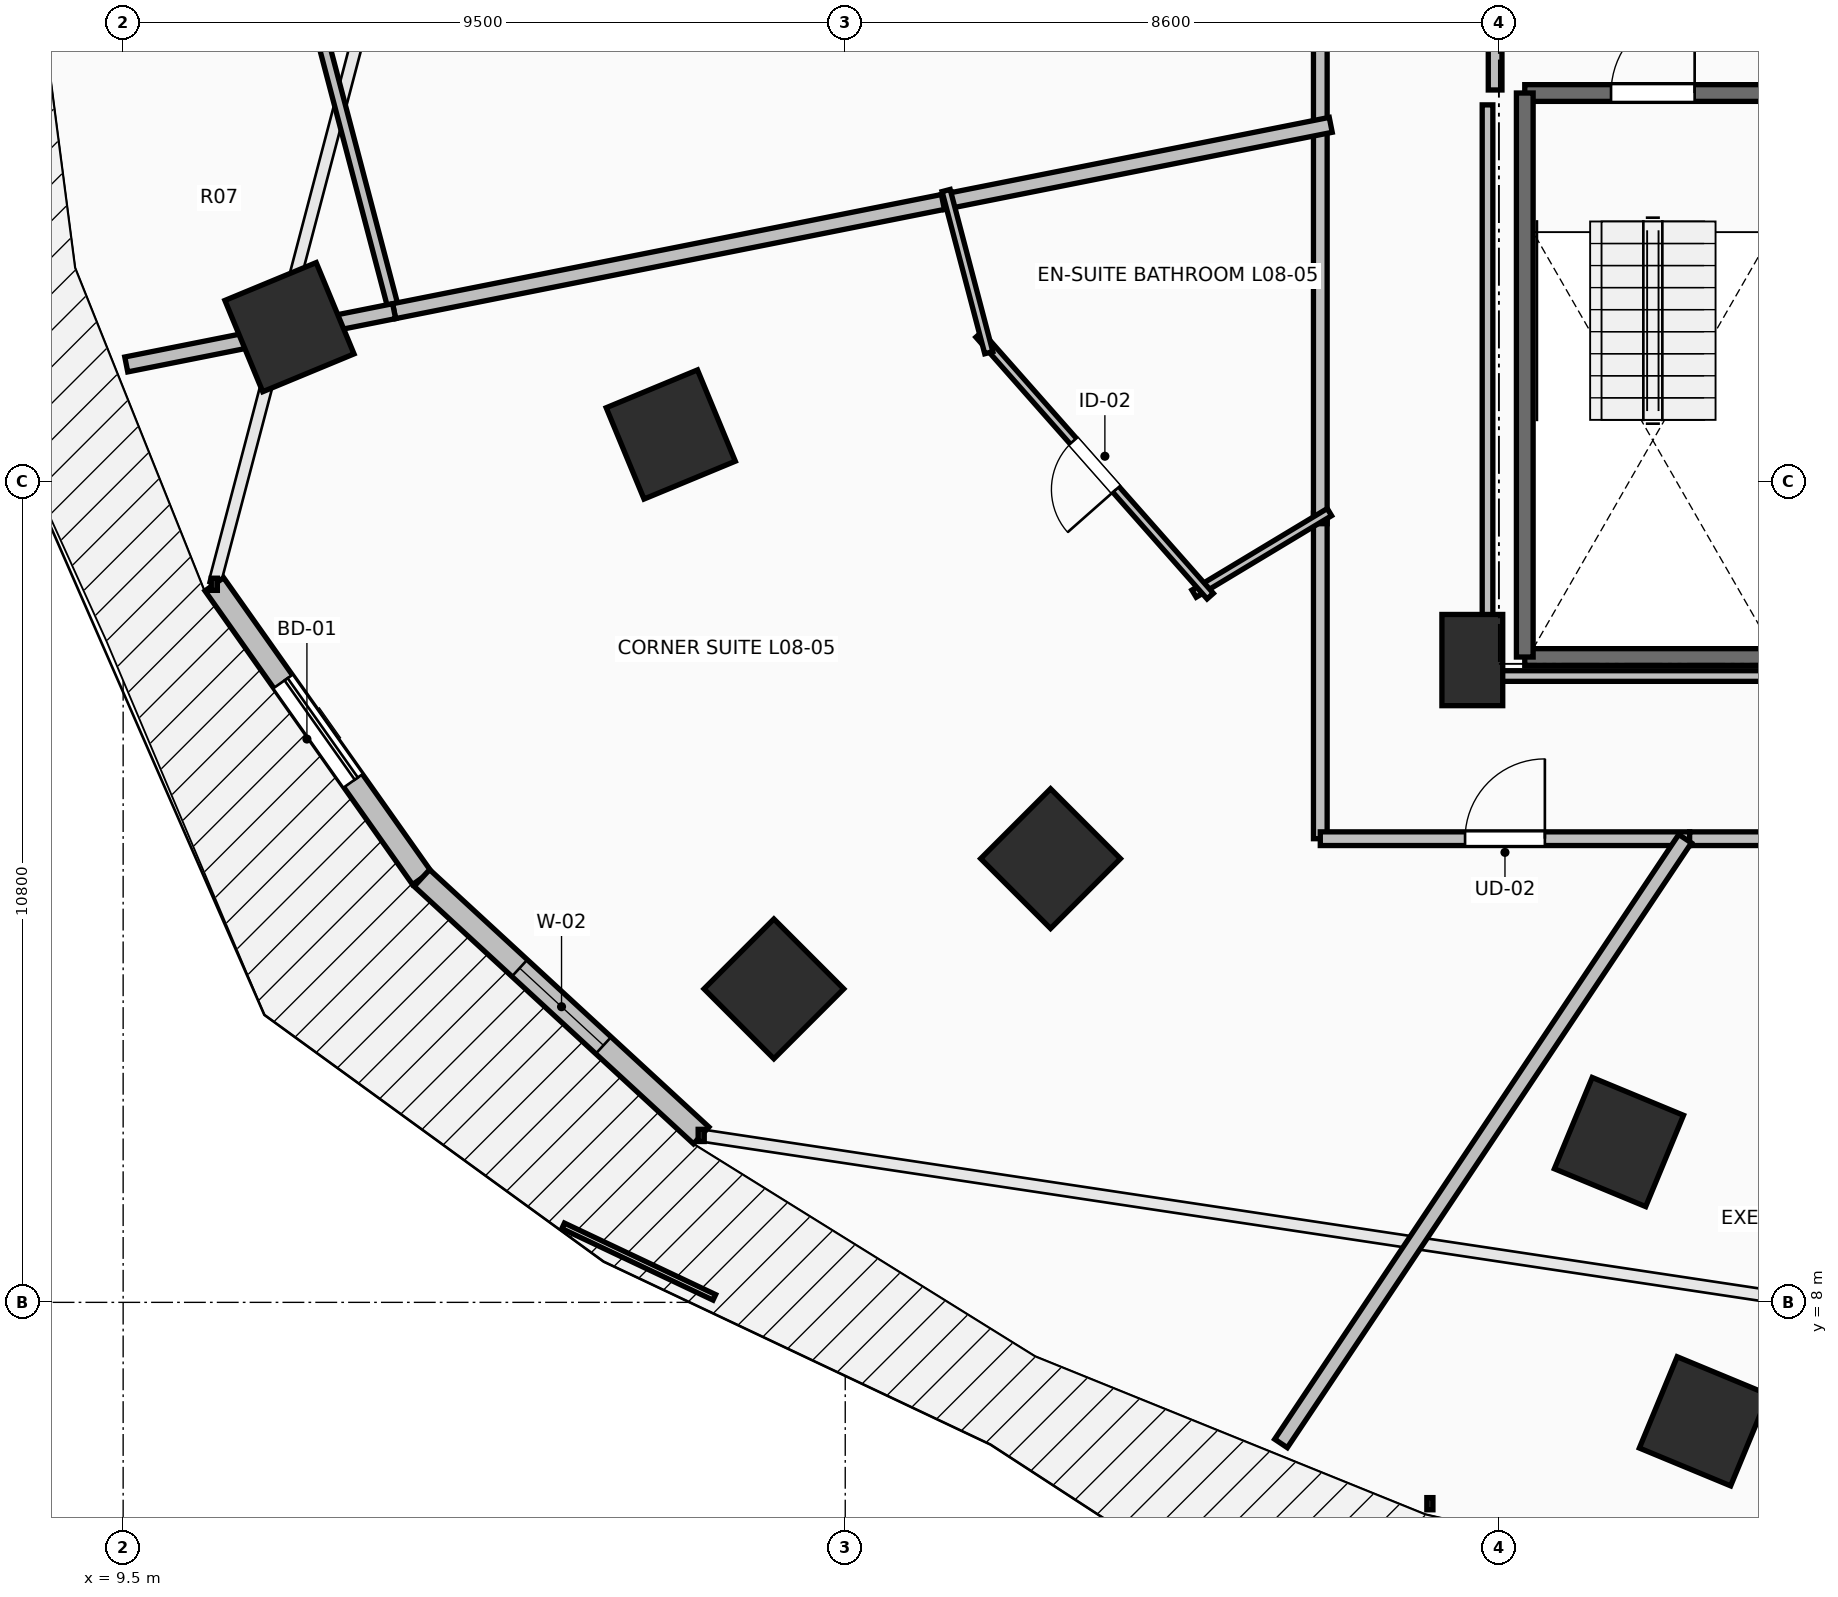
"""IFC4 building model, lengths in metres.
Left out: names, types, materials, properties, quantities, classifications, styles, units other than length and angle.
Written with IfcOpenShell. Run it as: python <this file> out.ifc"""

import sys

from ifc_helpers import new_model, si_unit, direction, frame, frame_2d, origin, origin_2d, place, context, subcontext, project, spatial, rectangle, extrude, element, fill, save


model = new_model("IFC4")
c1 = context("Model", 3, precision=1e-05, world=origin(), true_north=direction((0.0, 1.0)))
c2 = subcontext(c1, "Body", "Model", "MODEL_VIEW")
j1 = project(units=[si_unit("LENGTHUNIT", "METRE"), si_unit("PLANEANGLEUNIT", "RADIAN")], contexts=[c1])
p1 = place(None, origin())
s1 = spatial("IfcSite", under=j1, at=p1, CompositionType="ELEMENT")
p2 = place(p1, origin())
s2 = spatial("IfcBuilding", under=s1, at=p2, CompositionType="ELEMENT")
p3 = place(p2, frame((0.0, 0.0, 34.5)))
s3 = spatial("IfcBuildingStorey", under=s2, at=p3, CompositionType="ELEMENT", Elevation=34.5)
for number, where, z_axis, x_axis in (
    (1, (16.705, 19.418, 0.0), (0.0, 0.0, 1.0), (-0.924, -0.383, 0.0)),
    (2, (21.701, 13.838, 0.0), (0.0, 0.0, 1.0), (-0.707, -0.707, 0.0)),
    (3, (29.179, 10.109, 0.0), (0.0, 0.0, 1.0), (-0.383, -0.924, 0.0)),
    (4, (11.688, 20.83, 0.0), (0.0, 0.0, 1.0), (-0.924, -0.383, 0.0)),
    (5, (18.061, 12.124, 0.0), (0.0, 0.0, 1.0), (-0.707, -0.707, 0.0)),
    (6, (30.297, 6.435, 0.0), (0.0, 0.0, 1.0), (-0.383, -0.924, 0.0)),
):
    element("IfcColumn", number, at=place(p3, frame(where, z_axis=z_axis, x_axis=x_axis)), inside=s3, PredefinedType="COLUMN", context=c2, shape_type="SweptSolid", body=[
        extrude(rectangle(XDim=1.3, YDim=1.3, at=origin_2d()), origin(), (0.0, 0.0, 1.0), 3.5),
    ])
p4 = place(p3, frame((27.25, 16.45, 0.0), z_axis=(0.0, 0.0, 1.0), x_axis=(1.0, 0.0, 0.0)))
e7 = element("IfcColumn", 7, at=p4, inside=s3, PredefinedType="PILASTER", context=c2, shape_type="SweptSolid", body=[
    extrude(rectangle(XDim=0.8, YDim=1.2, at=origin_2d()), origin(), (0.0, 0.0, 1.0), 3.5),
])
p5 = place(p3, frame((10.699, 17.447, 0.0), z_axis=(0.0, 0.0, 1.0), x_axis=(0.577130815624, -0.816651713803, 0.0)))
e8 = element("IfcWall", 8, at=p5, inside=s3, PredefinedType="STANDARD", context=c2, shape_type="SweptSolid", body=[
    extrude(rectangle(XDim=4.731, YDim=0.3, at=frame_2d((2.366, 0.0))), origin(), (0.0, 0.0, 1.0), 3.24),
])
p6 = place(p5, frame((1.566, 0.0, 0.0)))
e9 = element("IfcOpeningElement", 9, at=p6, cuts=e8, PredefinedType="OPENING", context=c2, shape_type="SweptSolid", body=[
    extrude(rectangle(XDim=1.6, YDim=2.3, at=frame_2d((0.8, 1.15))), frame((0.0, 0.165, 0.0), z_axis=(0.0, -1.0, 0.0), x_axis=(1.0, 0.0, 0.0)), (0.0, 0.0, 1.0), 0.33),
])
p7 = place(p3, frame((13.43, 13.583, 0.0), z_axis=(0.0, 0.0, 1.0), x_axis=(0.735342629635, -0.677695519419, 0.0)))
e10 = element("IfcWall", 10, at=p7, inside=s3, PredefinedType="STANDARD", context=c2, shape_type="SweptSolid", body=[
    extrude(rectangle(XDim=4.997, YDim=0.3, at=frame_2d((2.499, 0.0))), origin(), (0.0, 0.0, 1.0), 3.24),
])
p8 = place(p7, frame((1.749, 0.0, 0.85)))
e11 = element("IfcOpeningElement", 11, at=p8, cuts=e10, PredefinedType="OPENING", context=c2, shape_type="SweptSolid", body=[
    extrude(rectangle(XDim=1.5, YDim=2.19, at=frame_2d((0.75, 1.095))), frame((0.0, 0.165, 0.0), z_axis=(0.0, -1.0, 0.0), x_axis=(1.0, 0.0, 0.0)), (0.0, 0.0, 1.0), 0.33),
])
p9 = place(p3, frame((27.94, 23.91, 0.0), z_axis=(0.0, 0.0, 1.0), x_axis=(1.0, 0.0, 0.0)))
e12 = element("IfcWall", 12, at=p9, inside=s3, PredefinedType="SOLIDWALL", context=c2, shape_type="SweptSolid", body=[
    extrude(rectangle(XDim=3.37, YDim=0.22, at=frame_2d((1.685, 0.0))), origin(), (0.0, 0.0, 1.0), 3.24),
])
p10 = place(p9, frame((1.135, 0.0, 0.0)))
e13 = element("IfcOpeningElement", 13, at=p10, cuts=e12, PredefinedType="OPENING", context=c2, shape_type="SweptSolid", body=[
    extrude(rectangle(XDim=1.1, YDim=2.15, at=frame_2d((0.55, 1.075))), frame((0.0, 0.125, 0.0), z_axis=(0.0, -1.0, 0.0), x_axis=(1.0, 0.0, 0.0)), (0.0, 0.0, 1.0), 0.25),
])
p11 = place(p3, frame((31.31, 16.49, 0.0), z_axis=(0.0, 0.0, 1.0), x_axis=(-1.0, 0.0, 0.0)))
e14 = element("IfcWall", 14, at=p11, inside=s3, PredefinedType="SOLIDWALL", context=c2, shape_type="SweptSolid", body=[
    extrude(rectangle(XDim=3.37, YDim=0.22, at=frame_2d((1.685, 0.0))), origin(), (0.0, 0.0, 1.0), 3.24),
])
p12 = place(p3, frame((27.94, 16.49, 0.0), z_axis=(0.0, 0.0, 1.0), x_axis=(0.0, 1.0, 0.0)))
e15 = element("IfcWall", 15, at=p12, inside=s3, PredefinedType="SOLIDWALL", context=c2, shape_type="SweptSolid", body=[
    extrude(rectangle(XDim=7.42, YDim=0.22, at=frame_2d((3.71, 0.0))), origin(), (0.0, 0.0, 1.0), 3.24),
])
p13 = place(p3, frame((27.55, 28.0, 0.0), z_axis=(0.0, 0.0, 1.0), x_axis=(0.0, -1.0, 0.0)))
e16 = element("IfcWall", 16, at=p13, inside=s3, PredefinedType="PARTITIONING", context=c2, shape_type="SweptSolid", body=[
    extrude(rectangle(XDim=4.05, YDim=0.18, at=frame_2d((2.025, 0.0))), origin(), (0.0, 0.0, 1.0), 3.24),
])
p14 = place(p13, frame((1.425, 0.0, 0.0)))
e17 = element("IfcOpeningElement", 17, at=p14, cuts=e16, PredefinedType="OPENING", context=c2, shape_type="SweptSolid", body=[
    extrude(rectangle(XDim=1.2, YDim=2.15, at=frame_2d((0.6, 1.075))), frame((0.0, 0.105, 0.0), z_axis=(0.0, -1.0, 0.0), x_axis=(1.0, 0.0, 0.0)), (0.0, 0.0, 1.0), 0.21),
])
p15 = place(p3, frame((25.25, 29.229, 0.0), z_axis=(0.0, 0.0, 1.0), x_axis=(0.0, -1.0, 0.0)))
e18 = element("IfcWall", 18, at=p15, inside=s3, PredefinedType="PARTITIONING", context=c2, shape_type="SweptSolid", body=[
    extrude(rectangle(XDim=5.826, YDim=0.18, at=frame_2d((2.913, 0.0))), origin(), (0.0, 0.0, 1.0), 2.432),
])
p16 = place(p15, frame((2.388, 0.0, 0.0)))
e19 = element("IfcOpeningElement", 19, at=p16, cuts=e18, PredefinedType="OPENING", context=c2, shape_type="SweptSolid", body=[
    extrude(rectangle(XDim=1.05, YDim=2.2, at=frame_2d((0.525, 1.1))), frame((0.0, 0.105, 0.0), z_axis=(0.0, -1.0, 0.0), x_axis=(1.0, 0.0, 0.0)), (0.0, 0.0, 1.0), 0.21),
])
p17 = place(p3, frame((25.25, 18.384, 0.0), z_axis=(0.0, 0.0, 1.0), x_axis=(0.0, -1.0, 0.0)))
e20 = element("IfcWall", 20, at=p17, inside=s3, PredefinedType="PARTITIONING", context=c2, shape_type="SweptSolid", body=[
    extrude(rectangle(XDim=4.284, YDim=0.18, at=frame_2d((2.142, 0.0))), origin(), (0.0, 0.0, 1.0), 2.432),
])
p18 = place(p3, frame((25.25, 14.1, 0.0), z_axis=(0.0, 0.0, 1.0), x_axis=(1.0, 0.0, 0.0)))
e21 = element("IfcWall", 21, at=p18, inside=s3, PredefinedType="PARTITIONING", context=c2, shape_type="SweptSolid", body=[
    extrude(rectangle(XDim=4.859, YDim=0.18, at=frame_2d((2.429, 0.0))), origin(), (0.0, 0.0, 1.0), 2.432),
])
p19 = place(p18, frame((1.905, 0.0, 0.0)))
e22 = element("IfcOpeningElement", 22, at=p19, cuts=e21, PredefinedType="OPENING", context=c2, shape_type="SweptSolid", body=[
    extrude(rectangle(XDim=1.05, YDim=2.2, at=frame_2d((0.525, 1.1))), frame((0.0, 0.105, 0.0), z_axis=(0.0, -1.0, 0.0), x_axis=(1.0, 0.0, 0.0)), (0.0, 0.0, 1.0), 0.21),
])
p20 = place(p3, frame((25.25, 23.543, 0.0), z_axis=(0.0, 0.0, 1.0), x_axis=(0.0, -1.0, 0.0)))
e23 = element("IfcWall", 23, at=p20, inside=s3, PredefinedType="PARTITIONING", context=c2, shape_type="SweptSolid", body=[
    extrude(rectangle(XDim=5.299, YDim=0.18, at=frame_2d((2.649, 0.0))), origin(), (0.0, 0.0, 1.0), 3.24),
])
p21 = place(p3, frame((30.109, 14.1, 0.0), z_axis=(0.0, 0.0, 1.0), x_axis=(1.0, 0.0, 0.0)))
e24 = element("IfcWall", 24, at=p21, inside=s3, PredefinedType="PARTITIONING", context=c2, shape_type="SweptSolid", body=[
    extrude(rectangle(XDim=10.319, YDim=0.18, at=frame_2d((5.16, 0.0))), origin(), (0.0, 0.0, 1.0), 3.24),
])
p22 = place(p21, frame((4.659, 0.0, 0.0)))
e25 = element("IfcOpeningElement", 25, at=p22, cuts=e24, PredefinedType="OPENING", context=c2, shape_type="SweptSolid", body=[
    extrude(rectangle(XDim=1.0, YDim=2.15, at=frame_2d((0.5, 1.075))), frame((0.0, 0.105, 0.0), z_axis=(0.0, -1.0, 0.0), x_axis=(1.0, 0.0, 0.0)), (0.0, 0.0, 1.0), 0.21),
])
p23 = place(p3, frame((11.76, 26.0, 0.0), z_axis=(0.0, 0.0, 1.0), x_axis=(0.254434720755, -0.967089950767, 0.0)))
e26 = element("IfcWall", 26, at=p23, inside=s3, PredefinedType="PARTITIONING", context=c2, shape_type="SweptSolid", body=[
    extrude(rectangle(XDim=5.129, YDim=0.14, at=frame_2d((2.564, 0.0))), origin(), (0.0, 0.0, 1.0), 2.432),
])
p24 = place(p3, frame((13.065, 21.04, 0.0), z_axis=(0.0, 0.0, 1.0), x_axis=(0.980774220135, 0.195145917502, 0.0)))
e27 = element("IfcWall", 27, at=p24, inside=s3, PredefinedType="PARTITIONING", context=c2, shape_type="SweptSolid", body=[
    extrude(rectangle(XDim=7.501, YDim=0.2, at=frame_2d((3.751, 0.0))), origin(), (0.0, 0.0, 1.0), 2.922),
])
p25 = place(p3, frame((20.285, 22.476, 0.0), z_axis=(0.0, 0.0, 1.0), x_axis=(0.980785905074, 0.195087181559, 0.0)))
e28 = element("IfcWall", 28, at=p25, inside=s3, PredefinedType="PARTITIONING", context=c2, shape_type="SweptSolid", body=[
    extrude(rectangle(XDim=5.202, YDim=0.2, at=frame_2d((2.601, 0.0))), origin(), (0.0, 0.0, 1.0), 2.972),
])
p26 = place(p3, frame((9.541, 20.339, 0.0), z_axis=(0.0, 0.0, 1.0), x_axis=(0.980786594985, 0.195083713053, 0.0)))
e29 = element("IfcWall", 29, at=p26, inside=s3, PredefinedType="PARTITIONING", context=c2, shape_type="SweptSolid", body=[
    extrude(rectangle(XDim=3.593, YDim=0.2, at=frame_2d((1.796, 0.0))), origin(), (0.0, 0.0, 1.0), 2.432),
])
p27 = place(p3, frame((25.37, 18.396, 0.0), z_axis=(0.0, 0.0, 1.0), x_axis=(-0.856631627837, -0.515928535932, 0.0)))
e30 = element("IfcWall", 30, at=p27, inside=s3, PredefinedType="PARTITIONING", context=c2, shape_type="SweptSolid", body=[
    extrude(rectangle(XDim=2.079, YDim=0.11, at=frame_2d((1.04, 0.0))), origin(), (0.0, 0.0, 1.0), 2.432),
])
p28 = place(p3, frame((23.802, 17.291, 0.0), z_axis=(0.0, 0.0, 1.0), x_axis=(-0.662071486681, 0.74944068913, 0.0)))
e31 = element("IfcWall", 31, at=p28, inside=s3, PredefinedType="PARTITIONING", context=c2, shape_type="SweptSolid", body=[
    extrude(rectangle(XDim=4.594, YDim=0.11, at=frame_2d((2.297, 0.0))), origin(), (0.0, 0.0, 1.0), 2.432),
])
p29 = place(p28, frame((1.872, 0.0, 0.0)))
e32 = element("IfcOpeningElement", 32, at=p29, cuts=e31, PredefinedType="OPENING", context=c2, shape_type="SweptSolid", body=[
    extrude(rectangle(XDim=0.85, YDim=2.1, at=frame_2d((0.425, 1.05))), frame((0.0, 0.07, 0.0), z_axis=(0.0, -1.0, 0.0), x_axis=(1.0, 0.0, 0.0)), (0.0, 0.0, 1.0), 0.14),
])
p30 = place(p3, frame((20.889, 20.494, 0.0), z_axis=(0.0, 0.0, 1.0), x_axis=(-0.254389812051, 0.967101764823, 0.0)))
e33 = element("IfcWall", 33, at=p30, inside=s3, PredefinedType="PARTITIONING", context=c2, shape_type="SweptSolid", body=[
    extrude(rectangle(XDim=2.206, YDim=0.11, at=frame_2d((1.103, 0.0))), origin(), (0.0, 0.0, 1.0), 3.24),
])
p31 = place(p3, frame((24.733, 6.144, 0.0), z_axis=(0.0, 0.0, 1.0), x_axis=(0.555577192504, 0.831464962082, 0.0)))
e34 = element("IfcWall", 34, at=p31, inside=s3, PredefinedType="PARTITIONING", context=c2, shape_type="SweptSolid", body=[
    extrude(rectangle(XDim=9.569, YDim=0.2, at=frame_2d((4.784, 0.0))), origin(), (0.0, 0.0, 1.0), 2.432),
])
p32 = place(p3, frame((31.195, 16.24, 0.0), z_axis=(0.0, 0.0, 1.0), x_axis=(-1.0, 0.0, 0.0)))
e35 = element("IfcWall", 35, at=p32, inside=s3, PredefinedType="PARTITIONING", context=c2, shape_type="SweptSolid", body=[
    extrude(rectangle(XDim=3.745, YDim=0.14, at=frame_2d((1.873, 0.0))), origin(), (0.0, 0.0, 1.0), 2.432),
])
p33 = place(p3, frame((27.45, 16.24, 0.0), z_axis=(0.0, 0.0, 1.0), x_axis=(0.0, 1.0, 0.0)))
e36 = element("IfcWall", 36, at=p33, inside=s3, PredefinedType="PARTITIONING", context=c2, shape_type="SweptSolid", body=[
    extrude(rectangle(XDim=7.514, YDim=0.14, at=frame_2d((3.757, 0.0))), origin(), (0.0, 0.0, 1.0), 2.432),
])
p34 = place(p6, origin())
e37 = element("IfcDoor", 37, at=p34, inside=s3, OperationType="SLIDING_TO_LEFT", PredefinedType="DOOR", context=c2, shape_type="SweptSolid", body=[
    extrude(rectangle(XDim=1.6, YDim=2.3, at=frame_2d((0.8, 1.15))), frame((0.0, 0.025, 0.0), z_axis=(0.0, -1.0, 0.0), x_axis=(1.0, 0.0, 0.0)), (0.0, 0.0, 1.0), 0.05),
])
fill(e9, e37)
p35 = place(p8, origin())
e38 = element("IfcWindow", 38, at=p35, inside=s3, PartitioningType="SINGLE_PANEL", PredefinedType="WINDOW", context=c2, shape_type="SweptSolid", body=[
    extrude(rectangle(XDim=1.5, YDim=2.19, at=frame_2d((0.75, 1.095))), frame((0.0, 0.03, 0.0), z_axis=(0.0, -1.0, 0.0), x_axis=(1.0, 0.0, 0.0)), (0.0, 0.0, 1.0), 0.06),
])
fill(e11, e38)
p36 = place(p10, origin())
e39 = element("IfcDoor", 39, at=p36, inside=s3, OperationType="SINGLE_SWING_RIGHT", PredefinedType="DOOR", context=c2, shape_type="SweptSolid", body=[
    extrude(rectangle(XDim=1.1, YDim=2.15, at=frame_2d((0.55, 1.075))), frame((0.0, 0.025, 0.0), z_axis=(0.0, -1.0, 0.0), x_axis=(1.0, 0.0, 0.0)), (0.0, 0.0, 1.0), 0.05),
])
fill(e13, e39)
p37 = place(p19, origin())
e40 = element("IfcDoor", 40, at=p37, inside=s3, OperationType="SINGLE_SWING_RIGHT", PredefinedType="DOOR", context=c2, shape_type="SweptSolid", body=[
    extrude(rectangle(XDim=1.05, YDim=2.2, at=frame_2d((0.525, 1.1))), frame((0.0, 0.025, 0.0), z_axis=(0.0, -1.0, 0.0), x_axis=(1.0, 0.0, 0.0)), (0.0, 0.0, 1.0), 0.05),
])
fill(e22, e40)
p38 = place(p29, origin())
e41 = element("IfcDoor", 41, at=p38, inside=s3, OperationType="SINGLE_SWING_LEFT", PredefinedType="DOOR", context=c2, shape_type="SweptSolid", body=[
    extrude(rectangle(XDim=0.85, YDim=2.1, at=frame_2d((0.425, 1.05))), frame((0.0, 0.025, 0.0), z_axis=(0.0, -1.0, 0.0), x_axis=(1.0, 0.0, 0.0)), (0.0, 0.0, 1.0), 0.05),
])
fill(e32, e41)
save(model, sys.argv[1])
